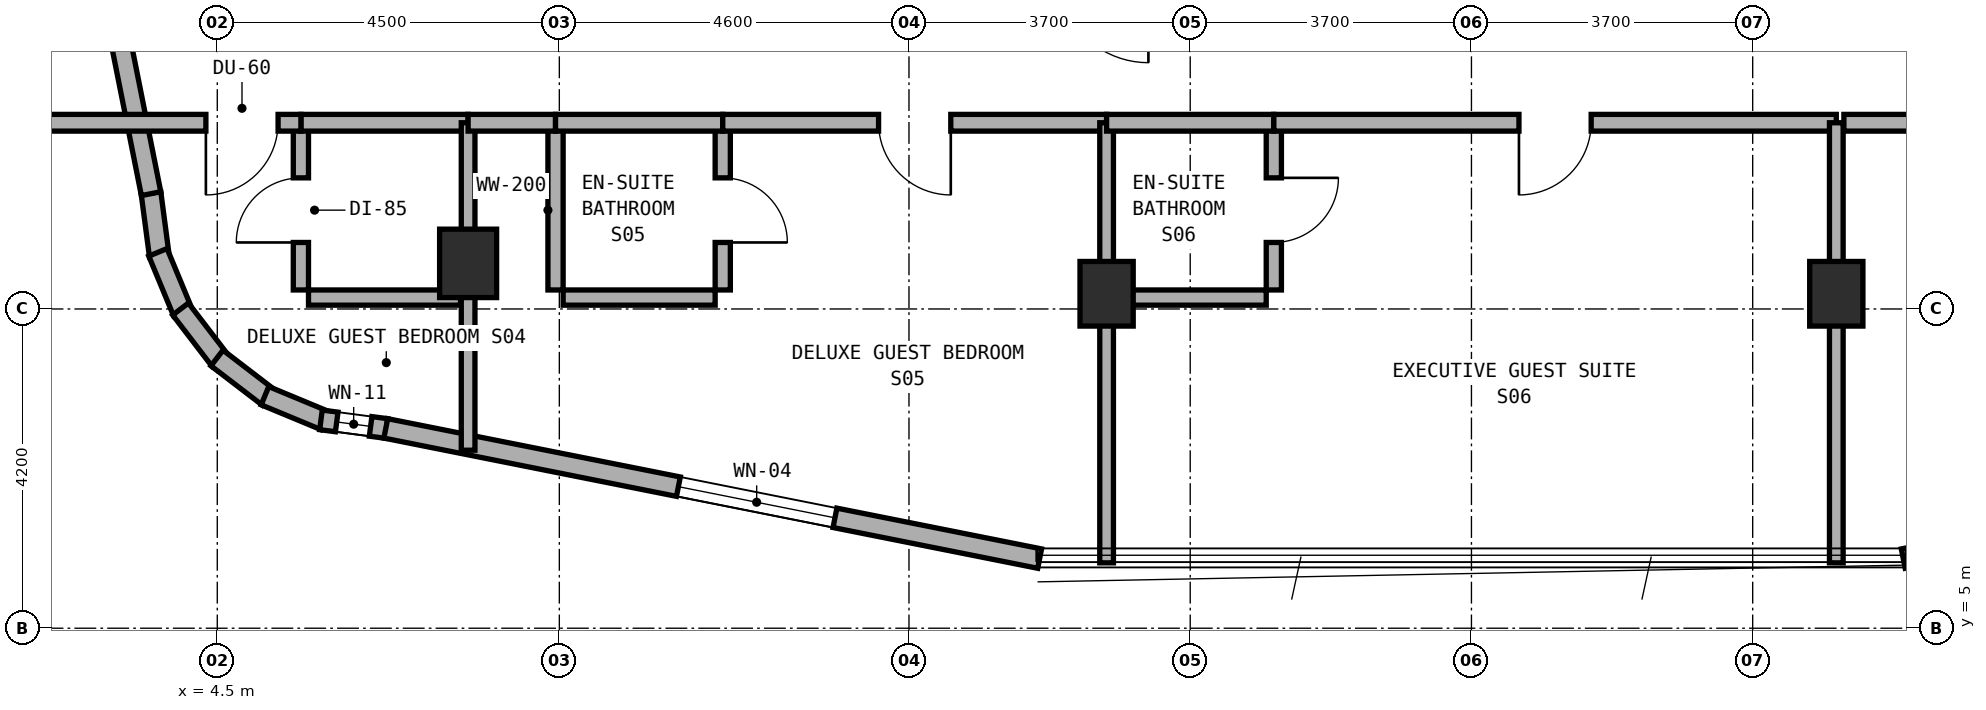
"""IFC4 building model, lengths in metres.
Left out: names, types, materials, properties, quantities, classifications, styles, units other than length and angle.
Written with IfcOpenShell. Run it as: python <this file> out.ifc"""

import sys

from ifc_helpers import new_model, si_unit, direction, frame, frame_2d, origin, origin_2d, place, context, subcontext, project, spatial, rectangle, extrude, element, fill, save


model = new_model("IFC4")
c1 = context("Model", 3, precision=1e-05, world=origin(), true_north=direction((0.0, 1.0)))
c2 = subcontext(c1, "Body", "Model", "MODEL_VIEW")
j1 = project(units=[si_unit("LENGTHUNIT", "METRE"), si_unit("PLANEANGLEUNIT", "RADIAN")], contexts=[c1])
p1 = place(None, origin())
s1 = spatial("IfcSite", under=j1, at=p1, CompositionType="ELEMENT")
p2 = place(p1, origin())
s2 = spatial("IfcBuilding", under=s1, at=p2, CompositionType="ELEMENT")
p3 = place(p2, frame((0.0, 0.0, 217.1)))
s3 = spatial("IfcBuildingStorey", under=s2, at=p3, CompositionType="ELEMENT", Elevation=217.1)
for number, where, z_axis, x_axis in (
    (1, (16.2, 9.4, 0.0), (0.0, 0.0, 1.0), (1.0, 0.0, 0.0)),
    (2, (25.8, 9.4, 0.0), (0.0, 0.0, 1.0), (1.0, 0.0, 0.0)),
):
    element("IfcColumn", number, at=place(p3, frame(where, z_axis=z_axis, x_axis=x_axis)), inside=s3, PredefinedType="COLUMN", context=c2, shape_type="SweptSolid", body=[
        extrude(rectangle(XDim=0.7, YDim=0.85, at=origin_2d()), origin(), (0.0, 0.0, 1.0), 3.6),
    ])
p4 = place(p3, frame((7.8, 9.8, 0.0), z_axis=(0.0, 0.0, 1.0), x_axis=(1.0, 0.0, 0.0)))
e3 = element("IfcColumn", 3, at=p4, inside=s3, PredefinedType="COLUMN", context=c2, shape_type="SweptSolid", body=[
    extrude(rectangle(XDim=0.75, YDim=0.9, at=origin_2d()), origin(), (0.0, 0.0, 1.0), 3.6),
])
p5 = place(p3, frame((3.628, 10.725, 0.0), z_axis=(0.0, 0.0, 1.0), x_axis=(0.130954667764, -0.9913883573, 0.0)))
e4 = element("IfcWall", 4, at=p5, inside=s3, PredefinedType="STANDARD", context=c2, shape_type="SweptSolid", body=[
    extrude(rectangle(XDim=0.833, YDim=0.26, at=frame_2d((0.417, 0.0))), origin(), (0.0, 0.0, 1.0), 3.32),
])
p6 = place(p3, frame((3.719, 9.945, 0.0), z_axis=(0.0, 0.0, 1.0), x_axis=(0.382985169477, -0.923754491172, 0.0)))
e5 = element("IfcWall", 5, at=p6, inside=s3, PredefinedType="STANDARD", context=c2, shape_type="SweptSolid", body=[
    extrude(rectangle(XDim=0.851, YDim=0.26, at=frame_2d((0.426, 0.0))), origin(), (0.0, 0.0, 1.0), 3.32),
])
for number, where, z_axis, x_axis in (
    (6, (4.017, 9.199, 0.0), (0.0, 0.0, 1.0), (0.608, -0.794, 0.0)),
    (7, (4.496, 8.555, 0.0), (0.0, 0.0, 1.0), (0.794, -0.608, 0.0)),
):
    element("IfcWall", number, at=place(p3, frame(where, z_axis=z_axis, x_axis=x_axis)), inside=s3, PredefinedType="STANDARD", context=c2, shape_type="SweptSolid", body=[
        extrude(rectangle(XDim=0.85, YDim=0.26, at=frame_2d((0.425, 0.0))), origin(), (0.0, 0.0, 1.0), 3.32),
    ])
p7 = place(p3, frame((5.127, 8.059, 0.0), z_axis=(0.0, 0.0, 1.0), x_axis=(0.923652976167, -0.383229930484, 0.0)))
e8 = element("IfcWall", 8, at=p7, inside=s3, PredefinedType="STANDARD", context=c2, shape_type="SweptSolid", body=[
    extrude(rectangle(XDim=0.851, YDim=0.26, at=frame_2d((0.426, 0.0))), origin(), (0.0, 0.0, 1.0), 3.32),
])
p8 = place(p3, frame((5.864, 7.741, 0.0), z_axis=(0.0, 0.0, 1.0), x_axis=(0.991493480548, -0.130156359936, 0.0)))
e9 = element("IfcWall", 9, at=p8, inside=s3, PredefinedType="STANDARD", context=c2, shape_type="SweptSolid", body=[
    extrude(rectangle(XDim=0.868, YDim=0.26, at=frame_2d((0.434, 0.0))), origin(), (0.0, 0.0, 1.0), 3.32),
])
p9 = place(p8, frame((0.209, 0.0, 0.85)))
e10 = element("IfcOpeningElement", 10, at=p9, cuts=e9, PredefinedType="OPENING", context=c2, shape_type="SweptSolid", body=[
    extrude(rectangle(XDim=0.45, YDim=1.5, at=frame_2d((0.225, 0.75))), frame((0.0, 0.14, 0.0), z_axis=(0.0, -1.0, 0.0), x_axis=(1.0, 0.0, 0.0)), (0.0, 0.0, 1.0), 0.28),
])
p10 = place(p3, frame((6.717, 7.629, 0.0), z_axis=(0.0, 0.0, 1.0), x_axis=(0.980745199176, -0.195291715883, 0.0)))
e11 = element("IfcWall", 11, at=p10, inside=s3, PredefinedType="STANDARD", context=c2, shape_type="SweptSolid", body=[
    extrude(rectangle(XDim=8.771, YDim=0.26, at=frame_2d((4.385, 0.0))), origin(), (0.0, 0.0, 1.0), 3.32),
])
p11 = place(p10, frame((3.925, 0.0, 0.85)))
e12 = element("IfcOpeningElement", 12, at=p11, cuts=e11, PredefinedType="OPENING", context=c2, shape_type="SweptSolid", body=[
    extrude(rectangle(XDim=2.1, YDim=1.5, at=frame_2d((1.05, 0.75))), frame((0.0, 0.14, 0.0), z_axis=(0.0, -1.0, 0.0), x_axis=(1.0, 0.0, 0.0)), (0.0, 0.0, 1.0), 0.28),
])
p12 = place(p3, frame((26.681, 5.916, 0.0), z_axis=(0.0, 0.0, 1.0), x_axis=(0.980745199176, 0.195291715883, 0.0)))
e13 = element("IfcWall", 13, at=p12, inside=s3, PredefinedType="STANDARD", context=c2, shape_type="SweptSolid", body=[
    extrude(rectangle(XDim=8.771, YDim=0.26, at=frame_2d((4.385, 0.0))), origin(), (0.0, 0.0, 1.0), 3.32),
])
p13 = place(p12, frame((3.335, 0.0, 0.85)))
e14 = element("IfcOpeningElement", 14, at=p13, cuts=e13, PredefinedType="OPENING", context=c2, shape_type="SweptSolid", body=[
    extrude(rectangle(XDim=2.1, YDim=1.5, at=frame_2d((1.05, 0.75))), frame((0.0, 0.14, 0.0), z_axis=(0.0, -1.0, 0.0), x_axis=(1.0, 0.0, 0.0)), (0.0, 0.0, 1.0), 0.28),
])
p14 = place(p3, frame((1.916, 19.319, 0.0), z_axis=(0.0, 0.0, 1.0), x_axis=(0.195291715883, -0.980745199176, 0.0)))
e15 = element("IfcWall", 15, at=p14, inside=s3, PredefinedType="STANDARD", context=c2, shape_type="SweptSolid", body=[
    extrude(rectangle(XDim=8.771, YDim=0.26, at=frame_2d((4.385, 0.0))), origin(), (0.0, 0.0, 1.0), 3.32),
])
p15 = place(p14, frame((2.798, 0.0, 0.85)))
e16 = element("IfcOpeningElement", 16, at=p15, cuts=e15, PredefinedType="OPENING", context=c2, shape_type="SweptSolid", body=[
    extrude(rectangle(XDim=2.1, YDim=1.5, at=frame_2d((1.05, 0.75))), frame((0.0, 0.14, 0.0), z_axis=(0.0, -1.0, 0.0), x_axis=(1.0, 0.0, 0.0)), (0.0, 0.0, 1.0), 0.28),
])
p16 = place(p3, frame((5.6, 9.45, 0.0), z_axis=(0.0, 0.0, 1.0), x_axis=(0.0, 1.0, 0.0)))
e17 = element("IfcWall", 17, at=p16, inside=s3, PredefinedType="PLUMBINGWALL", context=c2, shape_type="SweptSolid", body=[
    extrude(rectangle(XDim=2.1, YDim=0.2, at=frame_2d((1.05, 0.0))), origin(), (0.0, 0.0, 1.0), 3.32),
])
p17 = place(p16, frame((0.625, 0.0, 0.0)))
e18 = element("IfcOpeningElement", 18, at=p17, cuts=e17, PredefinedType="OPENING", context=c2, shape_type="SweptSolid", body=[
    extrude(rectangle(XDim=0.85, YDim=2.1, at=frame_2d((0.425, 1.05))), frame((0.0, 0.11, 0.0), z_axis=(0.0, -1.0, 0.0), x_axis=(1.0, 0.0, 0.0)), (0.0, 0.0, 1.0), 0.22),
])
p18 = place(p3, frame((5.7, 9.35, 0.0), z_axis=(0.0, 0.0, 1.0), x_axis=(1.0, 0.0, 0.0)))
e19 = element("IfcWall", 19, at=p18, inside=s3, PredefinedType="PLUMBINGWALL", context=c2, shape_type="SweptSolid", body=[
    extrude(rectangle(XDim=2.0, YDim=0.2, at=frame_2d((1.0, 0.0))), origin(), (0.0, 0.0, 1.0), 3.32),
])
p19 = place(p3, frame((5.6, 11.65, 0.0), z_axis=(0.0, 0.0, 1.0), x_axis=(1.0, 0.0, 0.0)))
e20 = element("IfcWall", 20, at=p19, inside=s3, PredefinedType="SOLIDWALL", context=c2, shape_type="SweptSolid", body=[
    extrude(rectangle(XDim=2.2, YDim=0.22, at=frame_2d((1.1, 0.0))), origin(), (0.0, 0.0, 1.0), 2.695),
])
p20 = place(p3, frame((1.96, 11.65, 0.0), z_axis=(0.0, 0.0, 1.0), x_axis=(1.0, 0.0, 0.0)))
e21 = element("IfcWall", 21, at=p20, inside=s3, PredefinedType="SOLIDWALL", context=c2, shape_type="SweptSolid", body=[
    extrude(rectangle(XDim=3.64, YDim=0.22, at=frame_2d((1.82, 0.0))), origin(), (0.0, 0.0, 1.0), 3.32),
])
p21 = place(p20, frame((2.39, 0.0, 0.0)))
e22 = element("IfcOpeningElement", 22, at=p21, cuts=e21, PredefinedType="OPENING", context=c2, shape_type="SweptSolid", body=[
    extrude(rectangle(XDim=0.95, YDim=2.1, at=frame_2d((0.475, 1.05))), frame((0.0, 0.12, 0.0), z_axis=(0.0, -1.0, 0.0), x_axis=(1.0, 0.0, 0.0)), (0.0, 0.0, 1.0), 0.24),
])
p22 = place(p3, frame((7.8, 7.342, 0.0), z_axis=(0.0, 0.0, 1.0), x_axis=(0.0, 1.0, 0.0)))
e23 = element("IfcWall", 23, at=p22, inside=s3, PredefinedType="SOLIDWALL", context=c2, shape_type="SweptSolid", body=[
    extrude(rectangle(XDim=4.308, YDim=0.18, at=frame_2d((2.154, 0.0))), origin(), (0.0, 0.0, 1.0), 2.695),
])
p23 = place(p3, frame((11.15, 9.45, 0.0), z_axis=(0.0, 0.0, 1.0), x_axis=(0.0, 1.0, 0.0)))
e24 = element("IfcWall", 24, at=p23, inside=s3, PredefinedType="PLUMBINGWALL", context=c2, shape_type="SweptSolid", body=[
    extrude(rectangle(XDim=2.1, YDim=0.2, at=frame_2d((1.05, 0.0))), origin(), (0.0, 0.0, 1.0), 2.995),
])
p24 = place(p23, frame((0.625, 0.0, 0.0)))
e25 = element("IfcOpeningElement", 25, at=p24, cuts=e24, PredefinedType="OPENING", context=c2, shape_type="SweptSolid", body=[
    extrude(rectangle(XDim=0.85, YDim=2.1, at=frame_2d((0.425, 1.05))), frame((0.0, 0.11, 0.0), z_axis=(0.0, -1.0, 0.0), x_axis=(1.0, 0.0, 0.0)), (0.0, 0.0, 1.0), 0.22),
])
p25 = place(p3, frame((9.05, 9.35, 0.0), z_axis=(0.0, 0.0, 1.0), x_axis=(1.0, 0.0, 0.0)))
e26 = element("IfcWall", 26, at=p25, inside=s3, PredefinedType="PLUMBINGWALL", context=c2, shape_type="SweptSolid", body=[
    extrude(rectangle(XDim=2.0, YDim=0.2, at=frame_2d((1.0, 0.0))), origin(), (0.0, 0.0, 1.0), 3.32),
])
p26 = place(p3, frame((8.95, 9.45, 0.0), z_axis=(0.0, 0.0, 1.0), x_axis=(0.0, 1.0, 0.0)))
e27 = element("IfcWall", 27, at=p26, inside=s3, PredefinedType="PLUMBINGWALL", context=c2, shape_type="SweptSolid", body=[
    extrude(rectangle(XDim=2.1, YDim=0.2, at=frame_2d((1.05, 0.0))), origin(), (0.0, 0.0, 1.0), 2.995),
])
p27 = place(p3, frame((7.8, 11.65, 0.0), z_axis=(0.0, 0.0, 1.0), x_axis=(1.0, 0.0, 0.0)))
e28 = element("IfcWall", 28, at=p27, inside=s3, PredefinedType="SOLIDWALL", context=c2, shape_type="SweptSolid", body=[
    extrude(rectangle(XDim=1.15, YDim=0.22, at=frame_2d((0.575, 0.0))), origin(), (0.0, 0.0, 1.0), 2.695),
])
p28 = place(p3, frame((8.95, 11.65, 0.0), z_axis=(0.0, 0.0, 1.0), x_axis=(1.0, 0.0, 0.0)))
e29 = element("IfcWall", 29, at=p28, inside=s3, PredefinedType="SOLIDWALL", context=c2, shape_type="SweptSolid", body=[
    extrude(rectangle(XDim=2.2, YDim=0.22, at=frame_2d((1.1, 0.0))), origin(), (0.0, 0.0, 1.0), 3.32),
])
p29 = place(p3, frame((11.15, 11.65, 0.0), z_axis=(0.0, 0.0, 1.0), x_axis=(1.0, 0.0, 0.0)))
e30 = element("IfcWall", 30, at=p29, inside=s3, PredefinedType="SOLIDWALL", context=c2, shape_type="SweptSolid", body=[
    extrude(rectangle(XDim=5.05, YDim=0.22, at=frame_2d((2.525, 0.0))), origin(), (0.0, 0.0, 1.0), 2.695),
])
p30 = place(p29, frame((2.05, 0.0, 0.0)))
e31 = element("IfcOpeningElement", 31, at=p30, cuts=e30, PredefinedType="OPENING", context=c2, shape_type="SweptSolid", body=[
    extrude(rectangle(XDim=0.95, YDim=2.1, at=frame_2d((0.475, 1.05))), frame((0.0, 0.12, 0.0), z_axis=(0.0, -1.0, 0.0), x_axis=(1.0, 0.0, 0.0)), (0.0, 0.0, 1.0), 0.24),
])
p31 = place(p3, frame((16.2, 5.86, 0.0), z_axis=(0.0, 0.0, 1.0), x_axis=(0.0, 1.0, 0.0)))
e32 = element("IfcWall", 32, at=p31, inside=s3, PredefinedType="SOLIDWALL", context=c2, shape_type="SweptSolid", body=[
    extrude(rectangle(XDim=5.79, YDim=0.18, at=frame_2d((2.895, 0.0))), origin(), (0.0, 0.0, 1.0), 2.695),
])
p32 = place(p3, frame((18.4, 9.45, 0.0), z_axis=(0.0, 0.0, 1.0), x_axis=(0.0, 1.0, 0.0)))
e33 = element("IfcWall", 33, at=p32, inside=s3, PredefinedType="PLUMBINGWALL", context=c2, shape_type="SweptSolid", body=[
    extrude(rectangle(XDim=2.1, YDim=0.2, at=frame_2d((1.05, 0.0))), origin(), (0.0, 0.0, 1.0), 2.995),
])
p33 = place(p32, frame((0.625, 0.0, 0.0)))
e34 = element("IfcOpeningElement", 34, at=p33, cuts=e33, PredefinedType="OPENING", context=c2, shape_type="SweptSolid", body=[
    extrude(rectangle(XDim=0.85, YDim=2.1, at=frame_2d((0.425, 1.05))), frame((0.0, 0.11, 0.0), z_axis=(0.0, -1.0, 0.0), x_axis=(1.0, 0.0, 0.0)), (0.0, 0.0, 1.0), 0.22),
])
p34 = place(p3, frame((16.3, 9.35, 0.0), z_axis=(0.0, 0.0, 1.0), x_axis=(1.0, 0.0, 0.0)))
e35 = element("IfcWall", 35, at=p34, inside=s3, PredefinedType="PLUMBINGWALL", context=c2, shape_type="SweptSolid", body=[
    extrude(rectangle(XDim=2.0, YDim=0.2, at=frame_2d((1.0, 0.0))), origin(), (0.0, 0.0, 1.0), 3.015),
])
p35 = place(p3, frame((16.2, 11.65, 0.0), z_axis=(0.0, 0.0, 1.0), x_axis=(1.0, 0.0, 0.0)))
e36 = element("IfcWall", 36, at=p35, inside=s3, PredefinedType="SOLIDWALL", context=c2, shape_type="SweptSolid", body=[
    extrude(rectangle(XDim=2.2, YDim=0.22, at=frame_2d((1.1, 0.0))), origin(), (0.0, 0.0, 1.0), 2.695),
])
p36 = place(p3, frame((18.4, 11.65, 0.0), z_axis=(0.0, 0.0, 1.0), x_axis=(1.0, 0.0, 0.0)))
e37 = element("IfcWall", 37, at=p36, inside=s3, PredefinedType="SOLIDWALL", context=c2, shape_type="SweptSolid", body=[
    extrude(rectangle(XDim=7.4, YDim=0.22, at=frame_2d((3.7, 0.0))), origin(), (0.0, 0.0, 1.0), 2.695),
])
p37 = place(p36, frame((3.225, 0.0, 0.0)))
e38 = element("IfcOpeningElement", 38, at=p37, cuts=e37, PredefinedType="OPENING", context=c2, shape_type="SweptSolid", body=[
    extrude(rectangle(XDim=0.95, YDim=2.1, at=frame_2d((0.475, 1.05))), frame((0.0, 0.12, 0.0), z_axis=(0.0, -1.0, 0.0), x_axis=(1.0, 0.0, 0.0)), (0.0, 0.0, 1.0), 0.24),
])
p38 = place(p3, frame((25.8, 5.86, 0.0), z_axis=(0.0, 0.0, 1.0), x_axis=(0.0, 1.0, 0.0)))
e39 = element("IfcWall", 39, at=p38, inside=s3, PredefinedType="SOLIDWALL", context=c2, shape_type="SweptSolid", body=[
    extrude(rectangle(XDim=5.79, YDim=0.18, at=frame_2d((2.895, 0.0))), origin(), (0.0, 0.0, 1.0), 2.695),
])
p39 = place(p3, frame((25.9, 11.65, 0.0), z_axis=(0.0, 0.0, 1.0), x_axis=(1.0, 0.0, 0.0)))
e40 = element("IfcWall", 40, at=p39, inside=s3, PredefinedType="SOLIDWALL", context=c2, shape_type="SweptSolid", body=[
    extrude(rectangle(XDim=14.04, YDim=0.22, at=frame_2d((7.02, 0.0))), origin(), (0.0, 0.0, 1.0), 2.695),
])
p40 = place(p39, frame((5.881, 0.0, 0.0)))
e41 = element("IfcOpeningElement", 41, at=p40, cuts=e40, PredefinedType="OPENING", context=c2, shape_type="SweptSolid", body=[
    extrude(rectangle(XDim=0.95, YDim=2.1, at=frame_2d((0.475, 1.05))), frame((0.0, 0.12, 0.0), z_axis=(0.0, -1.0, 0.0), x_axis=(1.0, 0.0, 0.0)), (0.0, 0.0, 1.0), 0.24),
])
p41 = place(p11, origin())
e42 = element("IfcWindow", 42, at=p41, inside=s3, PartitioningType="SINGLE_PANEL", PredefinedType="WINDOW", context=c2, shape_type="SweptSolid", body=[
    extrude(rectangle(XDim=2.1, YDim=1.5, at=frame_2d((1.05, 0.75))), frame((0.0, 0.03, 0.0), z_axis=(0.0, -1.0, 0.0), x_axis=(1.0, 0.0, 0.0)), (0.0, 0.0, 1.0), 0.06),
])
fill(e12, e42)
p42 = place(p9, origin())
e43 = element("IfcWindow", 43, at=p42, inside=s3, PartitioningType="SINGLE_PANEL", PredefinedType="WINDOW", context=c2, shape_type="SweptSolid", body=[
    extrude(rectangle(XDim=0.45, YDim=1.5, at=frame_2d((0.225, 0.75))), frame((0.0, 0.03, 0.0), z_axis=(0.0, -1.0, 0.0), x_axis=(1.0, 0.0, 0.0)), (0.0, 0.0, 1.0), 0.06),
])
fill(e10, e43)
p43 = place(p17, origin())
e44 = element("IfcDoor", 44, at=p43, inside=s3, OperationType="SINGLE_SWING_LEFT", PredefinedType="DOOR", context=c2, shape_type="SweptSolid", body=[
    extrude(rectangle(XDim=0.85, YDim=2.1, at=frame_2d((0.425, 1.05))), frame((0.0, 0.025, 0.0), z_axis=(0.0, -1.0, 0.0), x_axis=(1.0, 0.0, 0.0)), (0.0, 0.0, 1.0), 0.05),
])
fill(e18, e44)
p44 = place(p21, frame((0.95, 0.0, 0.0), z_axis=(0.0, 0.0, 1.0), x_axis=(-1.0, 0.0, 0.0)))
e45 = element("IfcDoor", 45, at=p44, inside=s3, OperationType="SINGLE_SWING_RIGHT", PredefinedType="DOOR", context=c2, shape_type="SweptSolid", body=[
    extrude(rectangle(XDim=0.95, YDim=2.1, at=frame_2d((0.475, 1.05))), frame((0.0, 0.025, 0.0), z_axis=(0.0, -1.0, 0.0), x_axis=(1.0, 0.0, 0.0)), (0.0, 0.0, 1.0), 0.05),
])
fill(e22, e45)
p45 = place(p24, frame((0.85, 0.0, 0.0), z_axis=(0.0, 0.0, 1.0), x_axis=(-1.0, 0.0, 0.0)))
e46 = element("IfcDoor", 46, at=p45, inside=s3, OperationType="SINGLE_SWING_RIGHT", PredefinedType="DOOR", context=c2, shape_type="SweptSolid", body=[
    extrude(rectangle(XDim=0.85, YDim=2.1, at=frame_2d((0.425, 1.05))), frame((0.0, 0.025, 0.0), z_axis=(0.0, -1.0, 0.0), x_axis=(1.0, 0.0, 0.0)), (0.0, 0.0, 1.0), 0.05),
])
fill(e25, e46)
p46 = place(p30, frame((0.95, 0.0, 0.0), z_axis=(0.0, 0.0, 1.0), x_axis=(-1.0, 0.0, 0.0)))
e47 = element("IfcDoor", 47, at=p46, inside=s3, OperationType="SINGLE_SWING_LEFT", PredefinedType="DOOR", context=c2, shape_type="SweptSolid", body=[
    extrude(rectangle(XDim=0.95, YDim=2.1, at=frame_2d((0.475, 1.05))), frame((0.0, 0.025, 0.0), z_axis=(0.0, -1.0, 0.0), x_axis=(1.0, 0.0, 0.0)), (0.0, 0.0, 1.0), 0.05),
])
fill(e31, e47)
p47 = place(p33, frame((0.85, 0.0, 0.0), z_axis=(0.0, 0.0, 1.0), x_axis=(-1.0, 0.0, 0.0)))
e48 = element("IfcDoor", 48, at=p47, inside=s3, OperationType="SINGLE_SWING_LEFT", PredefinedType="DOOR", context=c2, shape_type="SweptSolid", body=[
    extrude(rectangle(XDim=0.85, YDim=2.1, at=frame_2d((0.425, 1.05))), frame((0.0, 0.025, 0.0), z_axis=(0.0, -1.0, 0.0), x_axis=(1.0, 0.0, 0.0)), (0.0, 0.0, 1.0), 0.05),
])
fill(e34, e48)
p48 = place(p37, frame((0.95, 0.0, 0.0), z_axis=(0.0, 0.0, 1.0), x_axis=(-1.0, 0.0, 0.0)))
e49 = element("IfcDoor", 49, at=p48, inside=s3, OperationType="SINGLE_SWING_RIGHT", PredefinedType="DOOR", context=c2, shape_type="SweptSolid", body=[
    extrude(rectangle(XDim=0.95, YDim=2.1, at=frame_2d((0.475, 1.05))), frame((0.0, 0.025, 0.0), z_axis=(0.0, -1.0, 0.0), x_axis=(1.0, 0.0, 0.0)), (0.0, 0.0, 1.0), 0.05),
])
fill(e38, e49)
save(model, sys.argv[1])
